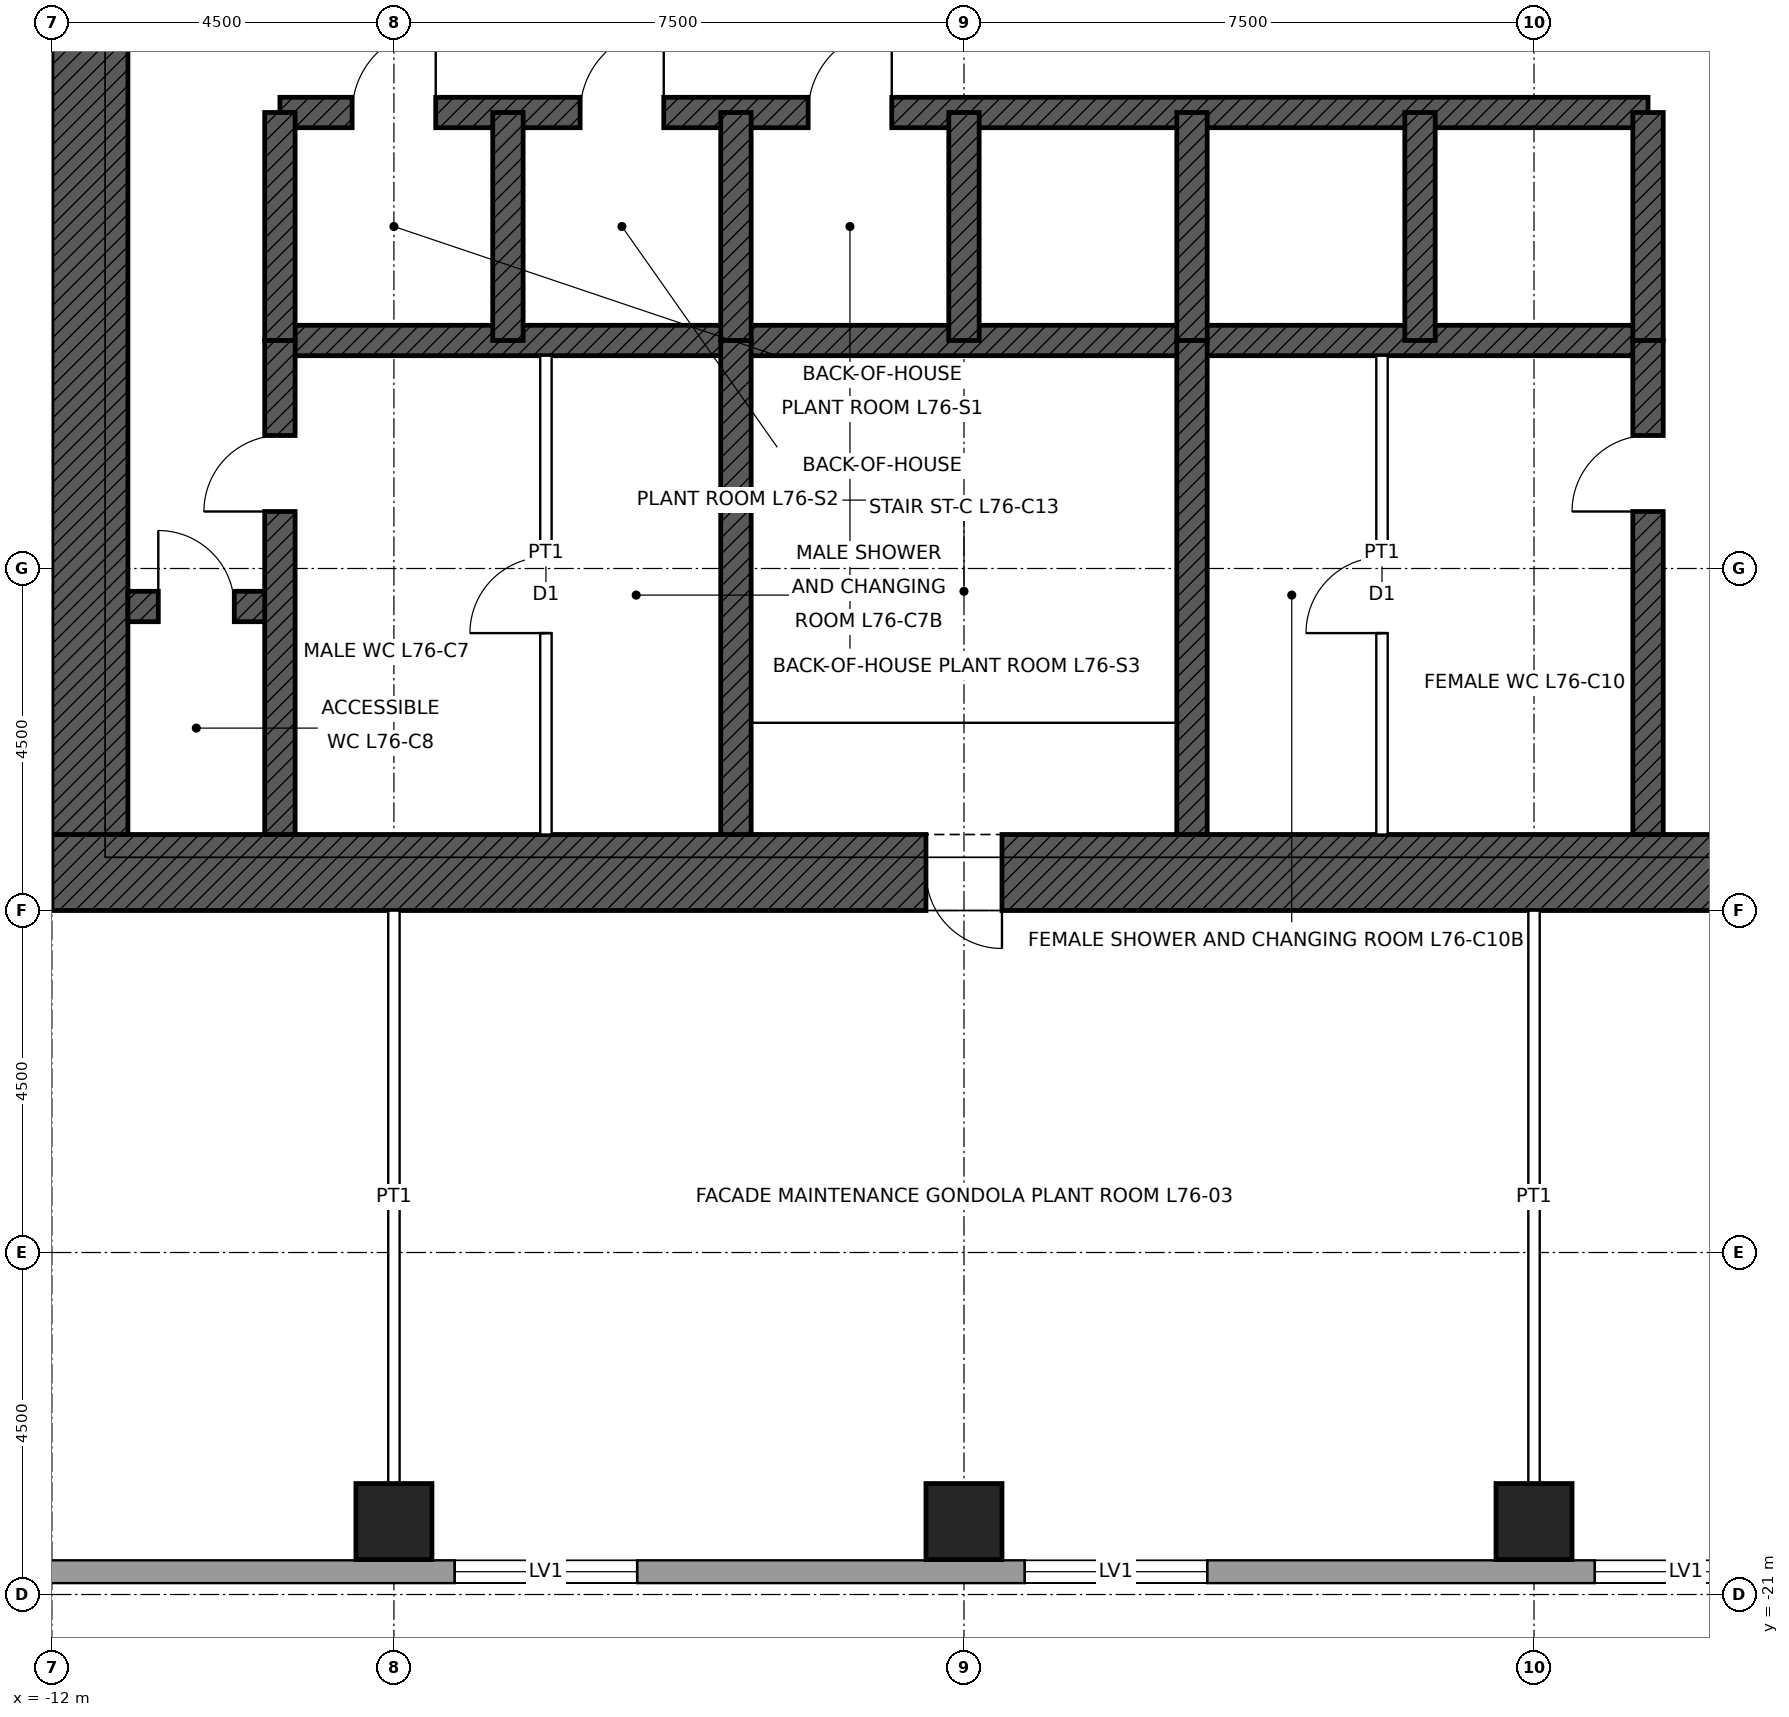
"""IFC4 building model, lengths in metres.
Left out: names, types, materials, properties, quantities, classifications, styles, units other than length and angle.
Written with IfcOpenShell. Run it as: python <this file> out.ifc"""

import sys

from ifc_helpers import new_model, si_unit, direction, frame, frame_2d, origin, origin_2d, place, context, subcontext, project, spatial, rectangle, hollow_rectangle, extrude, element, fill, save


model = new_model("IFC4")
c1 = context("Model", 3, precision=1e-05, world=origin(), true_north=direction((0.0, 1.0)))
c2 = subcontext(c1, "Body", "Model", "MODEL_VIEW")
j1 = project(units=[si_unit("LENGTHUNIT", "METRE"), si_unit("PLANEANGLEUNIT", "RADIAN")], contexts=[c1])
p1 = place(None, origin())
s1 = spatial("IfcSite", under=j1, at=p1, CompositionType="ELEMENT")
p2 = place(p1, origin())
s2 = spatial("IfcBuilding", under=s1, at=p2, CompositionType="ELEMENT")
p3 = place(p2, frame((0.0, 0.0, 341.9)))
s3 = spatial("IfcBuildingStorey", under=s2, at=p3, CompositionType="ELEMENT", Elevation=341.9)
for number, where, z_axis, x_axis in (
    (1, (7.5, -20.04, 0.0), (0.0, 0.0, 1.0), (1.0, 0.0, 0.0)),
    (2, (0.0, -20.04, 0.0), (0.0, 0.0, 1.0), (1.0, 0.0, 0.0)),
    (3, (-7.5, -20.04, 0.0), (0.0, 0.0, 1.0), (1.0, 0.0, 0.0)),
):
    element("IfcColumn", number, at=place(p3, frame(where, z_axis=z_axis, x_axis=x_axis)), inside=s3, PredefinedType="COLUMN", context=c2, shape_type="SweptSolid", body=[
        extrude(hollow_rectangle(XDim=1.0, YDim=1.0, WallThickness=0.075, at=origin_2d()), origin(), (0.0, 0.0, 1.0), 5.0),
    ])
p4 = place(p3, frame((12.0, -11.5, 0.0), z_axis=(0.0, 0.0, 1.0), x_axis=(-1.0, 0.0, 0.0)))
e4 = element("IfcWall", 4, at=p4, inside=s3, PredefinedType="SHEAR", context=c2, shape_type="SweptSolid", body=[
    extrude(rectangle(XDim=24.0, YDim=1.0, at=frame_2d((12.0, 0.0))), origin(), (0.0, 0.0, 1.0), 5.0),
])
p5 = place(p4, frame((11.5, 0.0, 0.0)))
e5 = element("IfcOpeningElement", 5, at=p5, cuts=e4, PredefinedType="OPENING", context=c2, shape_type="SweptSolid", body=[
    extrude(rectangle(XDim=1.0, YDim=2.1, at=frame_2d((0.5, 1.05))), frame((0.0, 0.51, 0.0), z_axis=(0.0, -1.0, 0.0), x_axis=(1.0, 0.0, 0.0)), (0.0, 0.0, 1.0), 1.02),
])
p6 = place(p4, frame((1.0, 0.0, 0.0)))
e6 = element("IfcOpeningElement", 6, at=p6, cuts=e4, PredefinedType="OPENING", context=c2, shape_type="SweptSolid", body=[
    extrude(rectangle(XDim=1.0, YDim=2.4, at=frame_2d((0.5, 1.2))), frame((0.0, 0.51, 0.0), z_axis=(0.0, -1.0, 0.0), x_axis=(1.0, 0.0, 0.0)), (0.0, 0.0, 1.0), 1.02),
])
p7 = place(p3, frame((-11.5, -11.0, 0.0), z_axis=(0.0, 0.0, 1.0), x_axis=(0.0, 1.0, 0.0)))
e7 = element("IfcWall", 7, at=p7, inside=s3, PredefinedType="SHEAR", context=c2, shape_type="SweptSolid", body=[
    extrude(rectangle(XDim=22.0, YDim=1.0, at=frame_2d((11.0, 0.0))), origin(), (0.0, 0.0, 1.0), 5.0),
])
p8 = place(p7, frame((10.5, 0.0, 0.0)))
e8 = element("IfcOpeningElement", 8, at=p8, cuts=e7, PredefinedType="OPENING", context=c2, shape_type="SweptSolid", body=[
    extrude(rectangle(XDim=1.0, YDim=2.4, at=frame_2d((0.5, 1.2))), frame((0.0, 0.51, 0.0), z_axis=(0.0, -1.0, 0.0), x_axis=(1.0, 0.0, 0.0)), (0.0, 0.0, 1.0), 1.02),
])
p9 = place(p3, frame((-9.0, -1.5, 0.0), z_axis=(0.0, 0.0, 1.0), x_axis=(1.0, 0.0, 0.0)))
e9 = element("IfcWall", 9, at=p9, inside=s3, PredefinedType="SHEAR", context=c2, shape_type="SweptSolid", body=[
    extrude(rectangle(XDim=18.0, YDim=0.4, at=frame_2d((9.0, 0.0))), origin(), (0.0, 0.0, 1.0), 5.0),
])
p10 = place(p9, frame((0.95, 0.0, 0.0)))
e10 = element("IfcOpeningElement", 10, at=p10, cuts=e9, PredefinedType="OPENING", context=c2, shape_type="SweptSolid", body=[
    extrude(rectangle(XDim=1.1, YDim=2.1, at=frame_2d((0.55, 1.05))), frame((0.0, 0.21, 0.0), z_axis=(0.0, -1.0, 0.0), x_axis=(1.0, 0.0, 0.0)), (0.0, 0.0, 1.0), 0.42),
])
p11 = place(p9, frame((3.95, 0.0, 0.0)))
e11 = element("IfcOpeningElement", 11, at=p11, cuts=e9, PredefinedType="OPENING", context=c2, shape_type="SweptSolid", body=[
    extrude(rectangle(XDim=1.1, YDim=2.1, at=frame_2d((0.55, 1.05))), frame((0.0, 0.21, 0.0), z_axis=(0.0, -1.0, 0.0), x_axis=(1.0, 0.0, 0.0)), (0.0, 0.0, 1.0), 0.42),
])
p12 = place(p9, frame((6.95, 0.0, 0.0)))
e12 = element("IfcOpeningElement", 12, at=p12, cuts=e9, PredefinedType="OPENING", context=c2, shape_type="SweptSolid", body=[
    extrude(rectangle(XDim=1.1, YDim=2.1, at=frame_2d((0.55, 1.05))), frame((0.0, 0.21, 0.0), z_axis=(0.0, -1.0, 0.0), x_axis=(1.0, 0.0, 0.0)), (0.0, 0.0, 1.0), 0.42),
])
p13 = place(p3, frame((-9.0, -4.5, 0.0), z_axis=(0.0, 0.0, 1.0), x_axis=(1.0, 0.0, 0.0)))
e13 = element("IfcWall", 13, at=p13, inside=s3, PredefinedType="SHEAR", context=c2, shape_type="SweptSolid", body=[
    extrude(rectangle(XDim=18.0, YDim=0.4, at=frame_2d((9.0, 0.0))), origin(), (0.0, 0.0, 1.0), 5.0),
])
p14 = place(p3, frame((-11.0, -8.0, 0.0), z_axis=(0.0, 0.0, 1.0), x_axis=(1.0, 0.0, 0.0)))
e14 = element("IfcWall", 14, at=p14, inside=s3, PredefinedType="SHEAR", context=c2, shape_type="SweptSolid", body=[
    extrude(rectangle(XDim=2.0, YDim=0.4, at=frame_2d((1.0, 0.0))), origin(), (0.0, 0.0, 1.0), 5.0),
])
p15 = place(p14, frame((0.4, 0.0, 0.0)))
e15 = element("IfcOpeningElement", 15, at=p15, cuts=e14, PredefinedType="OPENING", context=c2, shape_type="SweptSolid", body=[
    extrude(rectangle(XDim=1.0, YDim=2.1, at=frame_2d((0.5, 1.05))), frame((0.0, 0.21, 0.0), z_axis=(0.0, -1.0, 0.0), x_axis=(1.0, 0.0, 0.0)), (0.0, 0.0, 1.0), 0.42),
])
for number, where, z_axis, x_axis in (
    (16, (-9.0, -4.5, 0.0), (0.0, 0.0, 1.0), (0.0, 1.0, 0.0)),
    (17, (9.0, -4.5, 0.0), (0.0, 0.0, 1.0), (0.0, 1.0, 0.0)),
    (18, (-6.0, -4.5, 0.0), (0.0, 0.0, 1.0), (0.0, 1.0, 0.0)),
    (19, (-3.0, -4.5, 0.0), (0.0, 0.0, 1.0), (0.0, 1.0, 0.0)),
    (20, (0.0, -4.5, 0.0), (0.0, 0.0, 1.0), (0.0, 1.0, 0.0)),
    (21, (3.0, -4.5, 0.0), (0.0, 0.0, 1.0), (0.0, 1.0, 0.0)),
    (22, (6.0, -4.5, 0.0), (0.0, 0.0, 1.0), (0.0, 1.0, 0.0)),
):
    element("IfcWall", number, at=place(p3, frame(where, z_axis=z_axis, x_axis=x_axis)), inside=s3, PredefinedType="SHEAR", context=c2, shape_type="SweptSolid", body=[
        extrude(rectangle(XDim=3.0, YDim=0.4, at=frame_2d((1.5, 0.0))), origin(), (0.0, 0.0, 1.0), 5.0),
    ])
p16 = place(p3, frame((-9.0, -11.0, 0.0), z_axis=(0.0, 0.0, 1.0), x_axis=(0.0, 1.0, 0.0)))
e23 = element("IfcWall", 23, at=p16, inside=s3, PredefinedType="SHEAR", context=c2, shape_type="SweptSolid", body=[
    extrude(rectangle(XDim=6.5, YDim=0.4, at=frame_2d((3.25, 0.0))), origin(), (0.0, 0.0, 1.0), 5.0),
])
p17 = place(p16, frame((4.25, 0.0, 0.0)))
e24 = element("IfcOpeningElement", 24, at=p17, cuts=e23, PredefinedType="OPENING", context=c2, shape_type="SweptSolid", body=[
    extrude(rectangle(XDim=1.0, YDim=2.1, at=frame_2d((0.5, 1.05))), frame((0.0, 0.21, 0.0), z_axis=(0.0, -1.0, 0.0), x_axis=(1.0, 0.0, 0.0)), (0.0, 0.0, 1.0), 0.42),
])
p18 = place(p3, frame((9.0, -11.0, 0.0), z_axis=(0.0, 0.0, 1.0), x_axis=(0.0, 1.0, 0.0)))
e25 = element("IfcWall", 25, at=p18, inside=s3, PredefinedType="SHEAR", context=c2, shape_type="SweptSolid", body=[
    extrude(rectangle(XDim=6.5, YDim=0.4, at=frame_2d((3.25, 0.0))), origin(), (0.0, 0.0, 1.0), 5.0),
])
p19 = place(p18, frame((4.25, 0.0, 0.0)))
e26 = element("IfcOpeningElement", 26, at=p19, cuts=e25, PredefinedType="OPENING", context=c2, shape_type="SweptSolid", body=[
    extrude(rectangle(XDim=1.0, YDim=2.1, at=frame_2d((0.5, 1.05))), frame((0.0, 0.21, 0.0), z_axis=(0.0, -1.0, 0.0), x_axis=(1.0, 0.0, 0.0)), (0.0, 0.0, 1.0), 0.42),
])
for number, where, z_axis, x_axis in (
    (27, (-3.0, -11.0, 0.0), (0.0, 0.0, 1.0), (0.0, 1.0, 0.0)),
    (28, (3.0, -11.0, 0.0), (0.0, 0.0, 1.0), (0.0, 1.0, 0.0)),
):
    element("IfcWall", number, at=place(p3, frame(where, z_axis=z_axis, x_axis=x_axis)), inside=s3, PredefinedType="SHEAR", context=c2, shape_type="SweptSolid", body=[
        extrude(rectangle(XDim=6.5, YDim=0.4, at=frame_2d((3.25, 0.0))), origin(), (0.0, 0.0, 1.0), 5.0),
    ])
p20 = place(p3, frame((13.2, -20.7, 0.0), z_axis=(0.0, 0.0, 1.0), x_axis=(-1.0, 0.0, 0.0)))
e29 = element("IfcWall", 29, at=p20, inside=s3, PredefinedType="SOLIDWALL", context=c2, shape_type="SweptSolid", body=[
    extrude(rectangle(XDim=26.4, YDim=0.3, at=frame_2d((13.2, 0.0))), origin(), (0.0, 0.0, 1.0), 4.8),
])
p21 = place(p20, frame((2.5, 0.0, 0.6)))
e30 = element("IfcOpeningElement", 30, at=p21, cuts=e29, PredefinedType="OPENING", context=c2, shape_type="SweptSolid", body=[
    extrude(rectangle(XDim=2.4, YDim=2.4, at=frame_2d((1.2, 1.2))), frame((0.0, 0.16, 0.0), z_axis=(0.0, -1.0, 0.0), x_axis=(1.0, 0.0, 0.0)), (0.0, 0.0, 1.0), 0.32),
])
p22 = place(p20, frame((10.0, 0.0, 0.6)))
e31 = element("IfcOpeningElement", 31, at=p22, cuts=e29, PredefinedType="OPENING", context=c2, shape_type="SweptSolid", body=[
    extrude(rectangle(XDim=2.4, YDim=2.4, at=frame_2d((1.2, 1.2))), frame((0.0, 0.16, 0.0), z_axis=(0.0, -1.0, 0.0), x_axis=(1.0, 0.0, 0.0)), (0.0, 0.0, 1.0), 0.32),
])
p23 = place(p20, frame((17.5, 0.0, 0.6)))
e32 = element("IfcOpeningElement", 32, at=p23, cuts=e29, PredefinedType="OPENING", context=c2, shape_type="SweptSolid", body=[
    extrude(rectangle(XDim=2.4, YDim=2.4, at=frame_2d((1.2, 1.2))), frame((0.0, 0.16, 0.0), z_axis=(0.0, -1.0, 0.0), x_axis=(1.0, 0.0, 0.0)), (0.0, 0.0, 1.0), 0.32),
])
for number, where, z_axis, x_axis in (
    (33, (-7.5, -12.0, 0.0), (0.0, 0.0, 1.0), (0.0, -1.0, 0.0)),
    (34, (7.5, -12.0, 0.0), (0.0, 0.0, 1.0), (0.0, -1.0, 0.0)),
):
    element("IfcWall", number, at=place(p3, frame(where, z_axis=z_axis, x_axis=x_axis)), inside=s3, PredefinedType="PARTITIONING", context=c2, shape_type="SweptSolid", body=[
        extrude(rectangle(XDim=7.54, YDim=0.15, at=frame_2d((3.77, 0.0))), origin(), (0.0, 0.0, 1.0), 4.193),
    ])
p24 = place(p3, frame((-5.5, -11.0, 0.0), z_axis=(0.0, 0.0, 1.0), x_axis=(0.0, 1.0, 0.0)))
e35 = element("IfcWall", 35, at=p24, inside=s3, PredefinedType="PARTITIONING", context=c2, shape_type="SweptSolid", body=[
    extrude(rectangle(XDim=6.3, YDim=0.15, at=frame_2d((3.15, 0.0))), origin(), (0.0, 0.0, 1.0), 4.8),
])
p25 = place(p24, frame((2.65, 0.0, 0.0)))
e36 = element("IfcOpeningElement", 36, at=p25, cuts=e35, PredefinedType="OPENING", context=c2, shape_type="SweptSolid", body=[
    extrude(rectangle(XDim=1.0, YDim=2.1, at=frame_2d((0.5, 1.05))), frame((0.0, 0.085, 0.0), z_axis=(0.0, -1.0, 0.0), x_axis=(1.0, 0.0, 0.0)), (0.0, 0.0, 1.0), 0.17),
])
p26 = place(p3, frame((5.5, -11.0, 0.0), z_axis=(0.0, 0.0, 1.0), x_axis=(0.0, 1.0, 0.0)))
e37 = element("IfcWall", 37, at=p26, inside=s3, PredefinedType="PARTITIONING", context=c2, shape_type="SweptSolid", body=[
    extrude(rectangle(XDim=6.3, YDim=0.15, at=frame_2d((3.15, 0.0))), origin(), (0.0, 0.0, 1.0), 4.8),
])
p27 = place(p26, frame((2.65, 0.0, 0.0)))
e38 = element("IfcOpeningElement", 38, at=p27, cuts=e37, PredefinedType="OPENING", context=c2, shape_type="SweptSolid", body=[
    extrude(rectangle(XDim=1.0, YDim=2.1, at=frame_2d((0.5, 1.05))), frame((0.0, 0.085, 0.0), z_axis=(0.0, -1.0, 0.0), x_axis=(1.0, 0.0, 0.0)), (0.0, 0.0, 1.0), 0.17),
])
p28 = place(p21, origin())
e39 = element("IfcWindow", 39, at=p28, inside=s3, PartitioningType="SINGLE_PANEL", PredefinedType="WINDOW", context=c2, shape_type="SweptSolid", body=[
    extrude(rectangle(XDim=2.4, YDim=2.4, at=frame_2d((1.2, 1.2))), frame((0.0, 0.15, 0.0), z_axis=(0.0, -1.0, 0.0), x_axis=(1.0, 0.0, 0.0)), (0.0, 0.0, 1.0), 0.06),
])
fill(e30, e39)
p29 = place(p22, origin())
e40 = element("IfcWindow", 40, at=p29, inside=s3, PartitioningType="SINGLE_PANEL", PredefinedType="WINDOW", context=c2, shape_type="SweptSolid", body=[
    extrude(rectangle(XDim=2.4, YDim=2.4, at=frame_2d((1.2, 1.2))), frame((0.0, 0.15, 0.0), z_axis=(0.0, -1.0, 0.0), x_axis=(1.0, 0.0, 0.0)), (0.0, 0.0, 1.0), 0.06),
])
fill(e31, e40)
p30 = place(p23, origin())
e41 = element("IfcWindow", 41, at=p30, inside=s3, PartitioningType="SINGLE_PANEL", PredefinedType="WINDOW", context=c2, shape_type="SweptSolid", body=[
    extrude(rectangle(XDim=2.4, YDim=2.4, at=frame_2d((1.2, 1.2))), frame((0.0, 0.15, 0.0), z_axis=(0.0, -1.0, 0.0), x_axis=(1.0, 0.0, 0.0)), (0.0, 0.0, 1.0), 0.06),
])
fill(e32, e41)
p31 = place(p5, origin())
e42 = element("IfcDoor", 42, at=p31, inside=s3, OperationType="SINGLE_SWING_LEFT", PredefinedType="DOOR", context=c2, shape_type="SweptSolid", body=[
    extrude(rectangle(XDim=1.0, YDim=2.1, at=frame_2d((0.5, 1.05))), frame((0.0, 0.485, 0.0), z_axis=(0.0, -1.0, 0.0), x_axis=(1.0, 0.0, 0.0)), (0.0, 0.0, 1.0), 0.05),
])
fill(e5, e42)
p32 = place(p17, origin())
e43 = element("IfcDoor", 43, at=p32, inside=s3, OperationType="SINGLE_SWING_LEFT", PredefinedType="DOOR", context=c2, shape_type="SweptSolid", body=[
    extrude(rectangle(XDim=1.0, YDim=2.1, at=frame_2d((0.5, 1.05))), frame((0.0, 0.025, 0.0), z_axis=(0.0, -1.0, 0.0), x_axis=(1.0, 0.0, 0.0)), (0.0, 0.0, 1.0), 0.05),
])
fill(e24, e43)
p33 = place(p19, origin())
e44 = element("IfcDoor", 44, at=p33, inside=s3, OperationType="SINGLE_SWING_LEFT", PredefinedType="DOOR", context=c2, shape_type="SweptSolid", body=[
    extrude(rectangle(XDim=1.0, YDim=2.1, at=frame_2d((0.5, 1.05))), frame((0.0, 0.025, 0.0), z_axis=(0.0, -1.0, 0.0), x_axis=(1.0, 0.0, 0.0)), (0.0, 0.0, 1.0), 0.05),
])
fill(e26, e44)
p34 = place(p15, origin())
e45 = element("IfcDoor", 45, at=p34, inside=s3, OperationType="SINGLE_SWING_LEFT", PredefinedType="DOOR", context=c2, shape_type="SweptSolid", body=[
    extrude(rectangle(XDim=1.0, YDim=2.1, at=frame_2d((0.5, 1.05))), frame((0.0, 0.025, 0.0), z_axis=(0.0, -1.0, 0.0), x_axis=(1.0, 0.0, 0.0)), (0.0, 0.0, 1.0), 0.05),
])
fill(e15, e45)
p35 = place(p25, origin())
e46 = element("IfcDoor", 46, at=p35, inside=s3, OperationType="SINGLE_SWING_LEFT", PredefinedType="DOOR", context=c2, shape_type="SweptSolid", body=[
    extrude(rectangle(XDim=1.0, YDim=2.1, at=frame_2d((0.5, 1.05))), frame((0.0, 0.025, 0.0), z_axis=(0.0, -1.0, 0.0), x_axis=(1.0, 0.0, 0.0)), (0.0, 0.0, 1.0), 0.05),
])
fill(e36, e46)
p36 = place(p27, origin())
e47 = element("IfcDoor", 47, at=p36, inside=s3, OperationType="SINGLE_SWING_LEFT", PredefinedType="DOOR", context=c2, shape_type="SweptSolid", body=[
    extrude(rectangle(XDim=1.0, YDim=2.1, at=frame_2d((0.5, 1.05))), frame((0.0, 0.025, 0.0), z_axis=(0.0, -1.0, 0.0), x_axis=(1.0, 0.0, 0.0)), (0.0, 0.0, 1.0), 0.05),
])
fill(e38, e47)
p37 = place(p10, origin())
e48 = element("IfcDoor", 48, at=p37, inside=s3, OperationType="SINGLE_SWING_RIGHT", PredefinedType="DOOR", context=c2, shape_type="SweptSolid", body=[
    extrude(rectangle(XDim=1.1, YDim=2.1, at=frame_2d((0.55, 1.05))), frame((0.0, 0.025, 0.0), z_axis=(0.0, -1.0, 0.0), x_axis=(1.0, 0.0, 0.0)), (0.0, 0.0, 1.0), 0.05),
])
fill(e10, e48)
p38 = place(p11, origin())
e49 = element("IfcDoor", 49, at=p38, inside=s3, OperationType="SINGLE_SWING_RIGHT", PredefinedType="DOOR", context=c2, shape_type="SweptSolid", body=[
    extrude(rectangle(XDim=1.1, YDim=2.1, at=frame_2d((0.55, 1.05))), frame((0.0, 0.025, 0.0), z_axis=(0.0, -1.0, 0.0), x_axis=(1.0, 0.0, 0.0)), (0.0, 0.0, 1.0), 0.05),
])
fill(e11, e49)
p39 = place(p12, origin())
e50 = element("IfcDoor", 50, at=p39, inside=s3, OperationType="SINGLE_SWING_RIGHT", PredefinedType="DOOR", context=c2, shape_type="SweptSolid", body=[
    extrude(rectangle(XDim=1.1, YDim=2.1, at=frame_2d((0.55, 1.05))), frame((0.0, 0.025, 0.0), z_axis=(0.0, -1.0, 0.0), x_axis=(1.0, 0.0, 0.0)), (0.0, 0.0, 1.0), 0.05),
])
fill(e12, e50)
save(model, sys.argv[1])
